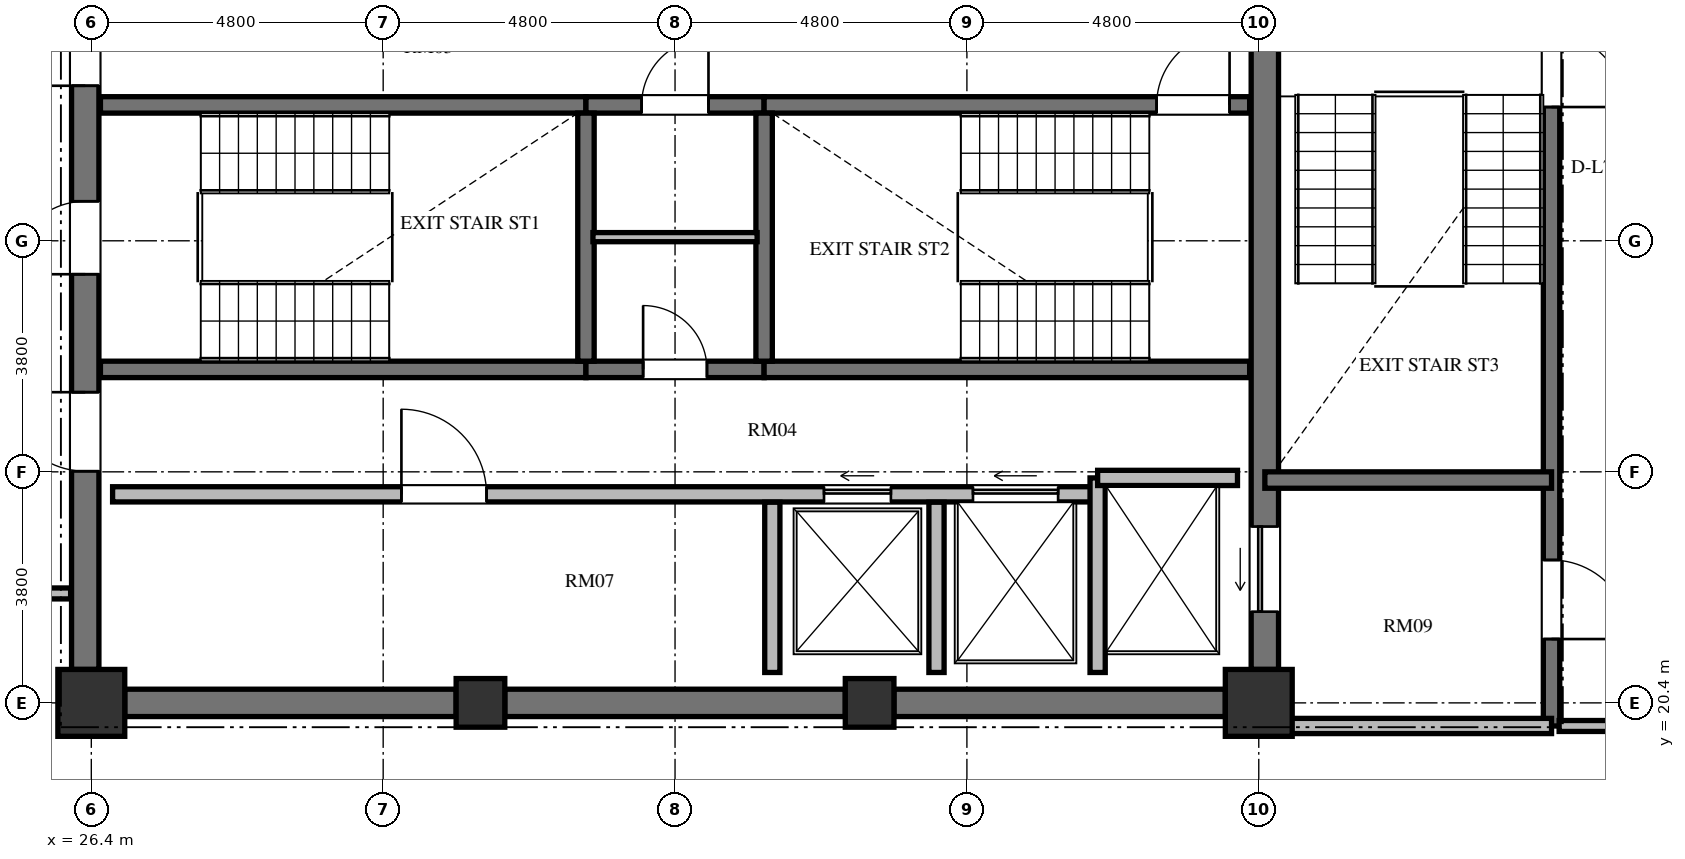
"""IFC4 building model, lengths in metres.
Left out: names, types, materials, properties, quantities, classifications, styles, units other than length and angle.
Written with IfcOpenShell. Run it as: python <this file> out.ifc"""

import sys

from ifc_helpers import new_model, si_unit, direction, frame, frame_2d, origin, origin_2d, place, context, subcontext, project, spatial, rectangle, extrude, element, fill, save


model = new_model("IFC4")
c1 = context("Model", 3, precision=1e-05, world=origin(), true_north=direction((0.0, 1.0)))
c2 = subcontext(c1, "Body", "Model", "MODEL_VIEW")
j1 = project(units=[si_unit("LENGTHUNIT", "METRE"), si_unit("PLANEANGLEUNIT", "RADIAN")], contexts=[c1])
p1 = place(None, origin())
s1 = spatial("IfcSite", under=j1, at=p1, CompositionType="ELEMENT")
p2 = place(p1, origin())
s2 = spatial("IfcBuilding", under=s1, at=p2, CompositionType="ELEMENT")
p3 = place(p2, frame((0.0, 0.0, 295.152)))
s3 = spatial("IfcBuildingStorey", under=s2, at=p3, CompositionType="ELEMENT", Elevation=295.152)
p4 = place(p3, frame((26.4, 20.4, 0.0), z_axis=(0.0, 0.0, 1.0), x_axis=(1.0, 0.0, 0.0)))
e1 = element("IfcColumn", 1, at=p4, inside=s3, PredefinedType="COLUMN", context=c2, shape_type="SweptSolid", body=[
    extrude(rectangle(XDim=1.1, YDim=1.1, at=origin_2d()), origin(), (0.0, 0.0, 1.0), 3.648),
])
for number, where, z_axis, x_axis in (
    (2, (32.8, 20.4, 0.0), (0.0, 0.0, 1.0), (1.0, 0.0, 0.0)),
    (3, (39.2, 20.4, 0.0), (0.0, 0.0, 1.0), (1.0, 0.0, 0.0)),
):
    element("IfcColumn", number, at=place(p3, frame(where, z_axis=z_axis, x_axis=x_axis)), inside=s3, PredefinedType="COLUMN", context=c2, shape_type="SweptSolid", body=[
        extrude(rectangle(XDim=0.8, YDim=0.8, at=origin_2d()), origin(), (0.0, 0.0, 1.0), 3.648),
    ])
p5 = place(p3, frame((45.6, 20.4, 0.0), z_axis=(0.0, 0.0, 1.0), x_axis=(1.0, 0.0, 0.0)))
e4 = element("IfcColumn", 4, at=p5, inside=s3, PredefinedType="COLUMN", context=c2, shape_type="SweptSolid", body=[
    extrude(rectangle(XDim=1.1, YDim=1.1, at=origin_2d()), origin(), (0.0, 0.0, 1.0), 3.648),
])
p6 = place(p3, frame((26.3, 20.95, 0.0), z_axis=(0.0, 0.0, 1.0), x_axis=(0.0, 1.0, 0.0)))
e5 = element("IfcWall", 5, at=p6, inside=s3, PredefinedType="SHEAR", context=c2, shape_type="SweptSolid", body=[
    extrude(rectangle(XDim=14.1, YDim=0.45, at=frame_2d((7.05, 0.0))), origin(), (0.0, 0.0, 1.0), 3.648),
])
p7 = place(p6, frame((6.5, 0.0, 0.0)))
e6 = element("IfcOpeningElement", 6, at=p7, cuts=e5, PredefinedType="OPENING", context=c2, shape_type="SweptSolid", body=[
    extrude(rectangle(XDim=1.2, YDim=2.15, at=frame_2d((0.6, 1.075))), frame((0.0, 0.235, 0.0), z_axis=(0.0, -1.0, 0.0), x_axis=(1.0, 0.0, 0.0)), (0.0, 0.0, 1.0), 0.47),
])
p8 = place(p6, frame((9.6, 0.0, 0.0)))
e7 = element("IfcOpeningElement", 7, at=p8, cuts=e5, PredefinedType="OPENING", context=c2, shape_type="SweptSolid", body=[
    extrude(rectangle(XDim=1.3, YDim=2.2, at=frame_2d((0.65, 1.1))), frame((0.0, 0.235, 0.0), z_axis=(0.0, -1.0, 0.0), x_axis=(1.0, 0.0, 0.0)), (0.0, 0.0, 1.0), 0.47),
])
p9 = place(p6, frame((3.26, 0.0, 0.0)))
e8 = element("IfcOpeningElement", 8, at=p9, cuts=e5, PredefinedType="OPENING", context=c2, shape_type="SweptSolid", body=[
    extrude(rectangle(XDim=1.3, YDim=2.2, at=frame_2d((0.65, 1.1))), frame((0.0, 0.235, 0.0), z_axis=(0.0, -1.0, 0.0), x_axis=(1.0, 0.0, 0.0)), (0.0, 0.0, 1.0), 0.47),
])
p10 = place(p3, frame((45.7, 20.95, 0.0), z_axis=(0.0, 0.0, 1.0), x_axis=(0.0, 1.0, 0.0)))
e9 = element("IfcWall", 9, at=p10, inside=s3, PredefinedType="SHEAR", context=c2, shape_type="SweptSolid", body=[
    extrude(rectangle(XDim=14.1, YDim=0.45, at=frame_2d((7.05, 0.0))), origin(), (0.0, 0.0, 1.0), 3.648),
])
p11 = place(p10, frame((11.75, 0.0, 0.0)))
e10 = element("IfcOpeningElement", 10, at=p11, cuts=e9, PredefinedType="OPENING", context=c2, shape_type="SweptSolid", body=[
    extrude(rectangle(XDim=1.4, YDim=2.3, at=frame_2d((0.7, 1.15))), frame((0.0, 0.235, 0.0), z_axis=(0.0, -1.0, 0.0), x_axis=(1.0, 0.0, 0.0)), (0.0, 0.0, 1.0), 0.47),
])
p12 = place(p10, frame((0.95, 0.0, 0.0)))
e11 = element("IfcOpeningElement", 11, at=p12, cuts=e9, PredefinedType="OPENING", context=c2, shape_type="SweptSolid", body=[
    extrude(rectangle(XDim=1.4, YDim=2.3, at=frame_2d((0.7, 1.15))), frame((0.0, 0.235, 0.0), z_axis=(0.0, -1.0, 0.0), x_axis=(1.0, 0.0, 0.0)), (0.0, 0.0, 1.0), 0.47),
])
p13 = place(p3, frame((26.95, 20.4, 0.0), z_axis=(0.0, 0.0, 1.0), x_axis=(1.0, 0.0, 0.0)))
e12 = element("IfcWall", 12, at=p13, inside=s3, PredefinedType="SHEAR", context=c2, shape_type="SweptSolid", body=[
    extrude(rectangle(XDim=5.45, YDim=0.45, at=frame_2d((2.725, 0.0))), origin(), (0.0, 0.0, 1.0), 3.648),
])
p14 = place(p3, frame((33.2, 20.4, 0.0), z_axis=(0.0, 0.0, 1.0), x_axis=(1.0, 0.0, 0.0)))
e13 = element("IfcWall", 13, at=p14, inside=s3, PredefinedType="SHEAR", context=c2, shape_type="SweptSolid", body=[
    extrude(rectangle(XDim=5.6, YDim=0.45, at=frame_2d((2.8, 0.0))), origin(), (0.0, 0.0, 1.0), 3.648),
])
p15 = place(p3, frame((39.6, 20.4, 0.0), z_axis=(0.0, 0.0, 1.0), x_axis=(1.0, 0.0, 0.0)))
e14 = element("IfcWall", 14, at=p15, inside=s3, PredefinedType="SHEAR", context=c2, shape_type="SweptSolid", body=[
    extrude(rectangle(XDim=5.45, YDim=0.45, at=frame_2d((2.725, 0.0))), origin(), (0.0, 0.0, 1.0), 3.648),
])
p16 = place(p3, frame((26.55, 30.235, 0.0), z_axis=(0.0, 0.0, 1.0), x_axis=(1.0, 0.0, 0.0)))
e15 = element("IfcWall", 15, at=p16, inside=s3, PredefinedType="SHEAR", context=c2, shape_type="SweptSolid", body=[
    extrude(rectangle(XDim=7.985, YDim=0.27, at=frame_2d((3.992, 0.0))), origin(), (0.0, 0.0, 1.0), 3.648),
])
p17 = place(p3, frame((34.535, 30.235, 0.0), z_axis=(0.0, 0.0, 1.0), x_axis=(1.0, 0.0, 0.0)))
e16 = element("IfcWall", 16, at=p17, inside=s3, PredefinedType="SHEAR", context=c2, shape_type="SweptSolid", body=[
    extrude(rectangle(XDim=2.93, YDim=0.27, at=frame_2d((1.465, 0.0))), origin(), (0.0, 0.0, 1.0), 3.648),
])
p18 = place(p17, frame((0.915, 0.0, 0.0)))
e17 = element("IfcOpeningElement", 17, at=p18, cuts=e16, PredefinedType="OPENING", context=c2, shape_type="SweptSolid", body=[
    extrude(rectangle(XDim=1.1, YDim=2.15, at=frame_2d((0.55, 1.075))), frame((0.0, 0.145, 0.0), z_axis=(0.0, -1.0, 0.0), x_axis=(1.0, 0.0, 0.0)), (0.0, 0.0, 1.0), 0.29),
])
p19 = place(p3, frame((37.465, 30.235, 0.0), z_axis=(0.0, 0.0, 1.0), x_axis=(1.0, 0.0, 0.0)))
e18 = element("IfcWall", 18, at=p19, inside=s3, PredefinedType="SHEAR", context=c2, shape_type="SweptSolid", body=[
    extrude(rectangle(XDim=7.985, YDim=0.27, at=frame_2d((3.992, 0.0))), origin(), (0.0, 0.0, 1.0), 3.648),
])
p20 = place(p19, frame((6.455, 0.0, 0.0)))
e19 = element("IfcOpeningElement", 19, at=p20, cuts=e18, PredefinedType="OPENING", context=c2, shape_type="SweptSolid", body=[
    extrude(rectangle(XDim=1.2, YDim=2.15, at=frame_2d((0.6, 1.075))), frame((0.0, 0.145, 0.0), z_axis=(0.0, -1.0, 0.0), x_axis=(1.0, 0.0, 0.0)), (0.0, 0.0, 1.0), 0.29),
])
p21 = place(p3, frame((26.55, 25.885, 0.0), z_axis=(0.0, 0.0, 1.0), x_axis=(1.0, 0.0, 0.0)))
e20 = element("IfcWall", 20, at=p21, inside=s3, PredefinedType="SHEAR", context=c2, shape_type="SweptSolid", body=[
    extrude(rectangle(XDim=7.985, YDim=0.27, at=frame_2d((3.992, 0.0))), origin(), (0.0, 0.0, 1.0), 3.648),
])
p22 = place(p3, frame((34.535, 25.885, 0.0), z_axis=(0.0, 0.0, 1.0), x_axis=(1.0, 0.0, 0.0)))
e21 = element("IfcWall", 21, at=p22, inside=s3, PredefinedType="SHEAR", context=c2, shape_type="SweptSolid", body=[
    extrude(rectangle(XDim=2.93, YDim=0.27, at=frame_2d((1.465, 0.0))), origin(), (0.0, 0.0, 1.0), 3.648),
])
p23 = place(p22, frame((0.94, 0.0, 0.0)))
e22 = element("IfcOpeningElement", 22, at=p23, cuts=e21, PredefinedType="OPENING", context=c2, shape_type="SweptSolid", body=[
    extrude(rectangle(XDim=1.05, YDim=2.15, at=frame_2d((0.525, 1.075))), frame((0.0, 0.145, 0.0), z_axis=(0.0, -1.0, 0.0), x_axis=(1.0, 0.0, 0.0)), (0.0, 0.0, 1.0), 0.29),
])
p24 = place(p3, frame((37.465, 25.885, 0.0), z_axis=(0.0, 0.0, 1.0), x_axis=(1.0, 0.0, 0.0)))
e23 = element("IfcWall", 23, at=p24, inside=s3, PredefinedType="SHEAR", context=c2, shape_type="SweptSolid", body=[
    extrude(rectangle(XDim=7.985, YDim=0.27, at=frame_2d((3.992, 0.0))), origin(), (0.0, 0.0, 1.0), 3.648),
])
for number, where, z_axis, x_axis in (
    (24, (34.535, 26.02, 0.0), (0.0, 0.0, 1.0), (0.0, 1.0, 0.0)),
    (25, (37.465, 26.02, 0.0), (0.0, 0.0, 1.0), (0.0, 1.0, 0.0)),
):
    element("IfcWall", number, at=place(p3, frame(where, z_axis=z_axis, x_axis=x_axis)), inside=s3, PredefinedType="SHEAR", context=c2, shape_type="SweptSolid", body=[
        extrude(rectangle(XDim=4.08, YDim=0.27, at=frame_2d((2.04, 0.0))), origin(), (0.0, 0.0, 1.0), 3.648),
    ])
p25 = place(p3, frame((34.65, 28.06, 0.0), z_axis=(0.0, 0.0, 1.0), x_axis=(1.0, 0.0, 0.0)))
e26 = element("IfcWall", 26, at=p25, inside=s3, PredefinedType="PARTITIONING", context=c2, shape_type="SweptSolid", body=[
    extrude(rectangle(XDim=2.7, YDim=0.15, at=frame_2d((1.35, 0.0))), origin(), (0.0, 0.0, 1.0), 3.448),
])
p26 = place(p3, frame((26.75, 23.83, 0.0), z_axis=(0.0, 0.0, 1.0), x_axis=(1.0, 0.0, 0.0)))
e27 = element("IfcWall", 27, at=p26, inside=s3, PredefinedType="SOLIDWALL", context=c2, shape_type="SweptSolid", body=[
    extrude(rectangle(XDim=16.2, YDim=0.25, at=frame_2d((8.1, 0.0))), origin(), (0.0, 0.0, 1.0), 3.448),
])
p27 = place(p26, frame((4.75, 0.0, 0.0)))
e28 = element("IfcOpeningElement", 28, at=p27, cuts=e27, PredefinedType="OPENING", context=c2, shape_type="SweptSolid", body=[
    extrude(rectangle(XDim=1.4, YDim=2.2, at=frame_2d((0.7, 1.1))), frame((0.0, 0.135, 0.0), z_axis=(0.0, -1.0, 0.0), x_axis=(1.0, 0.0, 0.0)), (0.0, 0.0, 1.0), 0.27),
])
p28 = place(p26, frame((11.7, 0.0, 0.0)))
e29 = element("IfcOpeningElement", 29, at=p28, cuts=e27, PredefinedType="OPENING", context=c2, shape_type="SweptSolid", body=[
    extrude(rectangle(XDim=1.1, YDim=2.2, at=frame_2d((0.55, 1.1))), frame((0.0, 0.135, 0.0), z_axis=(0.0, -1.0, 0.0), x_axis=(1.0, 0.0, 0.0)), (0.0, 0.0, 1.0), 0.27),
])
p29 = place(p26, frame((14.15, 0.0, 0.0)))
e30 = element("IfcOpeningElement", 30, at=p29, cuts=e27, PredefinedType="OPENING", context=c2, shape_type="SweptSolid", body=[
    extrude(rectangle(XDim=1.4, YDim=2.3, at=frame_2d((0.7, 1.15))), frame((0.0, 0.135, 0.0), z_axis=(0.0, -1.0, 0.0), x_axis=(1.0, 0.0, 0.0)), (0.0, 0.0, 1.0), 0.27),
])
p30 = place(p3, frame((42.95, 20.9, 0.0), z_axis=(0.0, 0.0, 1.0), x_axis=(0.0, 1.0, 0.0)))
e31 = element("IfcWall", 31, at=p30, inside=s3, PredefinedType="SOLIDWALL", context=c2, shape_type="SweptSolid", body=[
    extrude(rectangle(XDim=3.2, YDim=0.25, at=frame_2d((1.6, 0.0))), origin(), (0.0, 0.0, 1.0), 3.448),
])
p31 = place(p3, frame((42.95, 24.1, 0.0), z_axis=(0.0, 0.0, 1.0), x_axis=(1.0, 0.0, 0.0)))
e32 = element("IfcWall", 32, at=p31, inside=s3, PredefinedType="SOLIDWALL", context=c2, shape_type="SweptSolid", body=[
    extrude(rectangle(XDim=2.3, YDim=0.25, at=frame_2d((1.15, 0.0))), origin(), (0.0, 0.0, 1.0), 3.448),
])
for number, where, z_axis, x_axis in (
    (33, (37.6, 20.9, 0.0), (0.0, 0.0, 1.0), (0.0, 1.0, 0.0)),
    (34, (40.3, 20.9, 0.0), (0.0, 0.0, 1.0), (0.0, 1.0, 0.0)),
):
    element("IfcWall", number, at=place(p3, frame(where, z_axis=z_axis, x_axis=x_axis)), inside=s3, PredefinedType="SOLIDWALL", context=c2, shape_type="SweptSolid", body=[
        extrude(rectangle(XDim=2.8, YDim=0.25, at=frame_2d((1.4, 0.0))), origin(), (0.0, 0.0, 1.0), 3.448),
    ])
p32 = place(p3, frame((50.415, 35.845, 0.0), z_axis=(0.0, 0.0, 1.0), x_axis=(0.0, -1.0, 0.0)))
e35 = element("IfcWall", 35, at=p32, inside=s3, PredefinedType="SHEAR", context=c2, shape_type="SweptSolid", body=[
    extrude(rectangle(XDim=15.825, YDim=0.27, at=frame_2d((7.913, 0.0))), origin(), (0.0, 0.0, 1.0), 3.648),
])
p33 = place(p32, frame((4.445, 0.0, 0.0)))
e36 = element("IfcOpeningElement", 36, at=p33, cuts=e35, PredefinedType="OPENING", context=c2, shape_type="SweptSolid", body=[
    extrude(rectangle(XDim=1.2, YDim=2.15, at=frame_2d((0.6, 1.075))), frame((0.0, 0.145, 0.0), z_axis=(0.0, -1.0, 0.0), x_axis=(1.0, 0.0, 0.0)), (0.0, 0.0, 1.0), 0.29),
])
p34 = place(p32, frame((1.295, 0.0, 0.0)))
e37 = element("IfcOpeningElement", 37, at=p34, cuts=e35, PredefinedType="OPENING", context=c2, shape_type="SweptSolid", body=[
    extrude(rectangle(XDim=1.3, YDim=2.2, at=frame_2d((0.65, 1.1))), frame((0.0, 0.145, 0.0), z_axis=(0.0, -1.0, 0.0), x_axis=(1.0, 0.0, 0.0)), (0.0, 0.0, 1.0), 0.29),
])
p35 = place(p32, frame((13.095, 0.0, 0.0)))
e38 = element("IfcOpeningElement", 38, at=p35, cuts=e35, PredefinedType="OPENING", context=c2, shape_type="SweptSolid", body=[
    extrude(rectangle(XDim=1.3, YDim=2.2, at=frame_2d((0.65, 1.1))), frame((0.0, 0.145, 0.0), z_axis=(0.0, -1.0, 0.0), x_axis=(1.0, 0.0, 0.0)), (0.0, 0.0, 1.0), 0.29),
])
p36 = place(p3, frame((45.7, 24.065, 0.0), z_axis=(0.0, 0.0, 1.0), x_axis=(1.0, 0.0, 0.0)))
e39 = element("IfcWall", 39, at=p36, inside=s3, PredefinedType="SHEAR", context=c2, shape_type="SweptSolid", body=[
    extrude(rectangle(XDim=4.715, YDim=0.27, at=frame_2d((2.357, 0.0))), origin(), (0.0, 0.0, 1.0), 3.648),
])
p37 = place(p3, frame((45.7, 20.02, 0.0), z_axis=(0.0, 0.0, 1.0), x_axis=(1.0, 0.0, 0.0)))
e40 = element("IfcWall", 40, at=p37, inside=s3, PredefinedType="SOLIDWALL", context=c2, shape_type="SweptSolid", body=[
    extrude(rectangle(XDim=4.715, YDim=0.25, at=frame_2d((2.357, 0.0))), origin(), (0.0, 0.0, 1.0), 3.448),
])
p38 = place(p3, frame((52.358, 20.02, 0.0), z_axis=(0.0, 0.0, 1.0), x_axis=(-1.0, 0.0, 0.0)))
e41 = element("IfcWall", 41, at=p38, inside=s3, PredefinedType="PARTITIONING", context=c2, shape_type="SweptSolid", body=[
    extrude(rectangle(XDim=1.818, YDim=0.18, at=frame_2d((0.909, 0.0))), origin(), (0.0, 0.0, 1.0), 3.448),
])
p39 = place(p3, frame((26.06, 22.2, 0.0), z_axis=(0.0, 0.0, 1.0), x_axis=(-1.0, 0.0, 0.0)))
e42 = element("IfcWall", 42, at=p39, inside=s3, PredefinedType="PARTITIONING", context=c2, shape_type="SweptSolid", body=[
    extrude(rectangle(XDim=2.35, YDim=0.18, at=frame_2d((1.175, 0.0))), origin(), (0.0, 0.0, 1.0), 3.448),
])
p40 = place(p7, origin())
e43 = element("IfcDoor", 43, at=p40, inside=s3, OperationType="SINGLE_SWING_LEFT", PredefinedType="DOOR", context=c2, shape_type="SweptSolid", body=[
    extrude(rectangle(XDim=1.2, YDim=2.15, at=frame_2d((0.6, 1.075))), frame((0.0, 0.025, 0.0), z_axis=(0.0, -1.0, 0.0), x_axis=(1.0, 0.0, 0.0)), (0.0, 0.0, 1.0), 0.05),
])
fill(e6, e43)
p41 = place(p20, origin())
e44 = element("IfcDoor", 44, at=p41, inside=s3, OperationType="SINGLE_SWING_RIGHT", PredefinedType="DOOR", context=c2, shape_type="SweptSolid", body=[
    extrude(rectangle(XDim=1.2, YDim=2.15, at=frame_2d((0.6, 1.075))), frame((0.0, 0.025, 0.0), z_axis=(0.0, -1.0, 0.0), x_axis=(1.0, 0.0, 0.0)), (0.0, 0.0, 1.0), 0.05),
])
fill(e19, e44)
p42 = place(p23, origin())
e45 = element("IfcDoor", 45, at=p42, inside=s3, OperationType="SINGLE_SWING_LEFT", PredefinedType="DOOR", context=c2, shape_type="SweptSolid", body=[
    extrude(rectangle(XDim=1.05, YDim=2.15, at=frame_2d((0.525, 1.075))), frame((0.0, 0.025, 0.0), z_axis=(0.0, -1.0, 0.0), x_axis=(1.0, 0.0, 0.0)), (0.0, 0.0, 1.0), 0.05),
])
fill(e22, e45)
p43 = place(p18, origin())
e46 = element("IfcDoor", 46, at=p43, inside=s3, OperationType="SINGLE_SWING_RIGHT", PredefinedType="DOOR", context=c2, shape_type="SweptSolid", body=[
    extrude(rectangle(XDim=1.1, YDim=2.15, at=frame_2d((0.55, 1.075))), frame((0.0, 0.025, 0.0), z_axis=(0.0, -1.0, 0.0), x_axis=(1.0, 0.0, 0.0)), (0.0, 0.0, 1.0), 0.05),
])
fill(e17, e46)
p44 = place(p8, origin())
e47 = element("IfcDoor", 47, at=p44, inside=s3, OperationType="SINGLE_SWING_LEFT", PredefinedType="DOOR", context=c2, shape_type="SweptSolid", body=[
    extrude(rectangle(XDim=1.3, YDim=2.2, at=frame_2d((0.65, 1.1))), frame((0.0, 0.025, 0.0), z_axis=(0.0, -1.0, 0.0), x_axis=(1.0, 0.0, 0.0)), (0.0, 0.0, 1.0), 0.05),
])
fill(e7, e47)
p45 = place(p9, origin())
e48 = element("IfcDoor", 48, at=p45, inside=s3, OperationType="SINGLE_SWING_RIGHT", PredefinedType="DOOR", context=c2, shape_type="SweptSolid", body=[
    extrude(rectangle(XDim=1.3, YDim=2.2, at=frame_2d((0.65, 1.1))), frame((0.0, 0.025, 0.0), z_axis=(0.0, -1.0, 0.0), x_axis=(1.0, 0.0, 0.0)), (0.0, 0.0, 1.0), 0.05),
])
fill(e8, e48)
p46 = place(p27, origin())
e49 = element("IfcDoor", 49, at=p46, inside=s3, OperationType="SINGLE_SWING_LEFT", PredefinedType="DOOR", context=c2, shape_type="SweptSolid", body=[
    extrude(rectangle(XDim=1.4, YDim=2.2, at=frame_2d((0.7, 1.1))), frame((0.0, 0.025, 0.0), z_axis=(0.0, -1.0, 0.0), x_axis=(1.0, 0.0, 0.0)), (0.0, 0.0, 1.0), 0.05),
])
fill(e28, e49)
p47 = place(p28, origin())
e50 = element("IfcDoor", 50, at=p47, inside=s3, OperationType="SLIDING_TO_LEFT", PredefinedType="DOOR", context=c2, shape_type="SweptSolid", body=[
    extrude(rectangle(XDim=1.1, YDim=2.2, at=frame_2d((0.55, 1.1))), frame((0.0, 0.025, 0.0), z_axis=(0.0, -1.0, 0.0), x_axis=(1.0, 0.0, 0.0)), (0.0, 0.0, 1.0), 0.05),
])
fill(e29, e50)
p48 = place(p12, origin())
e51 = element("IfcDoor", 51, at=p48, inside=s3, OperationType="SLIDING_TO_LEFT", PredefinedType="DOOR", context=c2, shape_type="SweptSolid", body=[
    extrude(rectangle(XDim=1.4, YDim=2.3, at=frame_2d((0.7, 1.15))), frame((0.0, 0.025, 0.0), z_axis=(0.0, -1.0, 0.0), x_axis=(1.0, 0.0, 0.0)), (0.0, 0.0, 1.0), 0.05),
])
fill(e11, e51)
p49 = place(p29, origin())
e52 = element("IfcDoor", 52, at=p49, inside=s3, OperationType="SLIDING_TO_LEFT", PredefinedType="DOOR", context=c2, shape_type="SweptSolid", body=[
    extrude(rectangle(XDim=1.4, YDim=2.3, at=frame_2d((0.7, 1.15))), frame((0.0, 0.025, 0.0), z_axis=(0.0, -1.0, 0.0), x_axis=(1.0, 0.0, 0.0)), (0.0, 0.0, 1.0), 0.05),
])
fill(e30, e52)
p50 = place(p33, origin())
e53 = element("IfcDoor", 53, at=p50, inside=s3, OperationType="SINGLE_SWING_RIGHT", PredefinedType="DOOR", context=c2, shape_type="SweptSolid", body=[
    extrude(rectangle(XDim=1.2, YDim=2.15, at=frame_2d((0.6, 1.075))), frame((0.0, 0.025, 0.0), z_axis=(0.0, -1.0, 0.0), x_axis=(1.0, 0.0, 0.0)), (0.0, 0.0, 1.0), 0.05),
])
fill(e36, e53)
p51 = place(p35, origin())
e54 = element("IfcDoor", 54, at=p51, inside=s3, OperationType="SINGLE_SWING_RIGHT", PredefinedType="DOOR", context=c2, shape_type="SweptSolid", body=[
    extrude(rectangle(XDim=1.3, YDim=2.2, at=frame_2d((0.65, 1.1))), frame((0.0, 0.025, 0.0), z_axis=(0.0, -1.0, 0.0), x_axis=(1.0, 0.0, 0.0)), (0.0, 0.0, 1.0), 0.05),
])
fill(e38, e54)
save(model, sys.argv[1])
